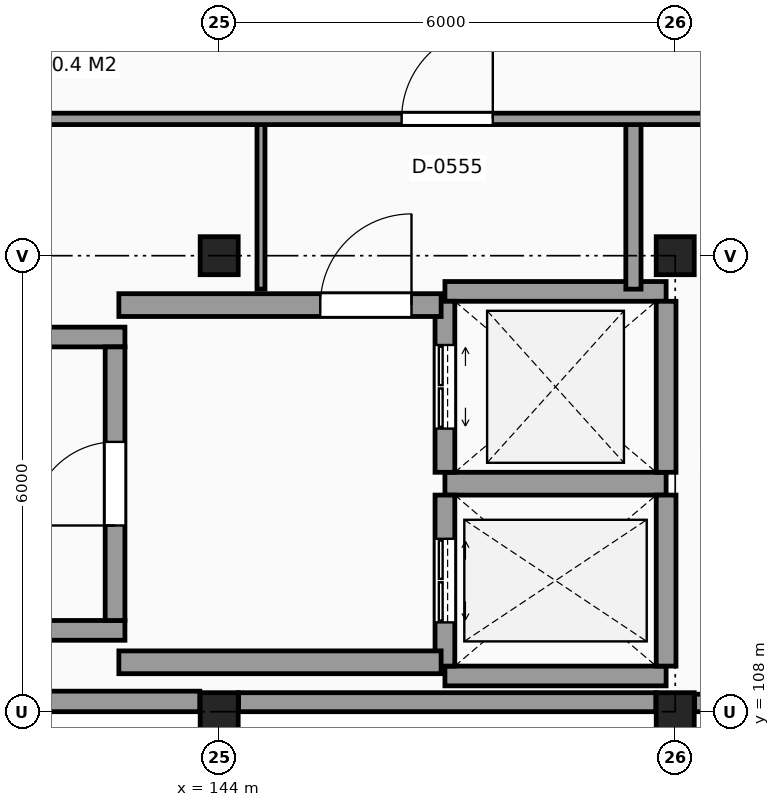
"""IFC4 building model, lengths in metres.
Left out: names, types, materials, properties, quantities, classifications, styles, units other than length and angle.
Written with IfcOpenShell. Run it as: python <this file> out.ifc"""

import sys

from ifc_helpers import new_model, si_unit, direction, frame, frame_2d, origin, origin_2d, place, context, subcontext, project, spatial, rectangle, extrude, element, fill, save


model = new_model("IFC4")
c1 = context("Model", 3, precision=1e-05, world=origin(), true_north=direction((0.0, 1.0)))
c2 = subcontext(c1, "Body", "Model", "MODEL_VIEW")
j1 = project(units=[si_unit("LENGTHUNIT", "METRE"), si_unit("PLANEANGLEUNIT", "RADIAN")], contexts=[c1])
p1 = place(None, origin())
s1 = spatial("IfcSite", under=j1, at=p1, CompositionType="ELEMENT")
p2 = place(p1, origin())
s2 = spatial("IfcBuilding", under=s1, at=p2, CompositionType="ELEMENT")
p3 = place(p2, frame((0.0, 0.0, 41.4)))
s3 = spatial("IfcBuildingStorey", under=s2, at=p3, CompositionType="ELEMENT", Elevation=41.4)
for number, where, z_axis, x_axis in (
    (1, (144.0, 108.0, 0.0), (0.0, 0.0, 1.0), (1.0, 0.0, 0.0)),
    (2, (144.0, 114.0, 0.0), (0.0, 0.0, 1.0), (1.0, 0.0, 0.0)),
    (3, (150.0, 108.0, 0.0), (0.0, 0.0, 1.0), (1.0, 0.0, 0.0)),
    (4, (150.0, 114.0, 0.0), (0.0, 0.0, 1.0), (1.0, 0.0, 0.0)),
):
    element("IfcColumn", number, at=place(p3, frame(where, z_axis=z_axis, x_axis=x_axis)), inside=s3, PredefinedType="COLUMN", context=c2, shape_type="SweptSolid", body=[
        extrude(rectangle(XDim=0.5, YDim=0.5, at=origin_2d()), origin(), (0.0, 0.0, 1.0), 3.3),
    ])
p4 = place(p3, frame((138.255, 108.135, 0.0), z_axis=(0.0, 0.0, 1.0), x_axis=(1.0, 0.0, 0.0)))
e5 = element("IfcWall", 5, at=p4, inside=s3, PredefinedType="SOLIDWALL", context=c2, shape_type="SweptSolid", body=[
    extrude(rectangle(XDim=5.49, YDim=0.27, at=frame_2d((2.745, 0.0))), origin(), (0.0, 0.0, 1.0), 2.41),
])
p5 = place(p3, frame((144.255, 108.125, 0.0), z_axis=(0.0, 0.0, 1.0), x_axis=(1.0, 0.0, 0.0)))
e6 = element("IfcWall", 6, at=p5, inside=s3, PredefinedType="SOLIDWALL", context=c2, shape_type="SweptSolid", body=[
    extrude(rectangle(XDim=5.49, YDim=0.25, at=frame_2d((2.745, 0.0))), origin(), (0.0, 0.0, 1.0), 2.41),
])
p6 = place(p3, frame((150.255, 108.115, 0.0), z_axis=(0.0, 0.0, 1.0), x_axis=(1.0, 0.0, 0.0)))
e7 = element("IfcWall", 7, at=p6, inside=s3, PredefinedType="SOLIDWALL", context=c2, shape_type="SweptSolid", body=[
    extrude(rectangle(XDim=5.49, YDim=0.23, at=frame_2d((2.745, 0.0))), origin(), (0.0, 0.0, 1.0), 2.41),
])
p7 = place(p6, frame((2.045, 0.0, 0.8)))
e8 = element("IfcOpeningElement", 8, at=p7, cuts=e7, PredefinedType="OPENING", context=c2, shape_type="SweptSolid", body=[
    extrude(rectangle(XDim=1.4, YDim=1.4, at=frame_2d((0.7, 0.7))), frame((0.0, 0.125, 0.0), z_axis=(0.0, -1.0, 0.0), x_axis=(1.0, 0.0, 0.0)), (0.0, 0.0, 1.0), 0.25),
])
for number, where, z_axis, x_axis in (
    (9, (132.04, 109.07, 0.0), (0.0, 0.0, 1.0), (1.0, 0.0, 0.0)),
    (10, (132.04, 112.93, 0.0), (0.0, 0.0, 1.0), (1.0, 0.0, 0.0)),
):
    element("IfcWall", number, at=place(p3, frame(where, z_axis=z_axis, x_axis=x_axis)), inside=s3, PredefinedType="SHEAR", context=c2, shape_type="SweptSolid", body=[
        extrude(rectangle(XDim=10.72, YDim=0.26, at=frame_2d((5.36, 0.0))), origin(), (0.0, 0.0, 1.0), 3.3),
    ])
p8 = place(p3, frame((142.63, 109.2, 0.0), z_axis=(0.0, 0.0, 1.0), x_axis=(0.0, 1.0, 0.0)))
e11 = element("IfcWall", 11, at=p8, inside=s3, PredefinedType="SHEAR", context=c2, shape_type="SweptSolid", body=[
    extrude(rectangle(XDim=3.6, YDim=0.26, at=frame_2d((1.8, 0.0))), origin(), (0.0, 0.0, 1.0), 3.3),
])
p9 = place(p8, frame((1.25, 0.0, 0.0)))
e12 = element("IfcOpeningElement", 12, at=p9, cuts=e11, PredefinedType="OPENING", context=c2, shape_type="SweptSolid", body=[
    extrude(rectangle(XDim=1.1, YDim=2.15, at=frame_2d((0.55, 1.075))), frame((0.0, 0.14, 0.0), z_axis=(0.0, -1.0, 0.0), x_axis=(1.0, 0.0, 0.0)), (0.0, 0.0, 1.0), 0.28),
])
p10 = place(p3, frame((146.97, 108.47, 0.0), z_axis=(0.0, 0.0, 1.0), x_axis=(1.0, 0.0, 0.0)))
e13 = element("IfcWall", 13, at=p10, inside=s3, PredefinedType="SHEAR", context=c2, shape_type="SweptSolid", body=[
    extrude(rectangle(XDim=2.91, YDim=0.26, at=frame_2d((1.455, 0.0))), origin(), (0.0, 0.0, 1.0), 3.3),
])
p11 = place(p3, frame((146.97, 111.0, 0.0), z_axis=(0.0, 0.0, 1.0), x_axis=(1.0, 0.0, 0.0)))
e14 = element("IfcWall", 14, at=p11, inside=s3, PredefinedType="SHEAR", context=c2, shape_type="SweptSolid", body=[
    extrude(rectangle(XDim=2.91, YDim=0.3, at=frame_2d((1.455, 0.0))), origin(), (0.0, 0.0, 1.0), 3.3),
])
p12 = place(p3, frame((149.88, 108.6, 0.0), z_axis=(0.0, 0.0, 1.0), x_axis=(0.0, 1.0, 0.0)))
e15 = element("IfcWall", 15, at=p12, inside=s3, PredefinedType="SHEAR", context=c2, shape_type="SweptSolid", body=[
    extrude(rectangle(XDim=2.25, YDim=0.26, at=frame_2d((1.125, 0.0))), origin(), (0.0, 0.0, 1.0), 3.3),
])
p13 = place(p3, frame((146.97, 108.6, 0.0), z_axis=(0.0, 0.0, 1.0), x_axis=(0.0, 1.0, 0.0)))
e16 = element("IfcWall", 16, at=p13, inside=s3, PredefinedType="SHEAR", context=c2, shape_type="SweptSolid", body=[
    extrude(rectangle(XDim=2.25, YDim=0.26, at=frame_2d((1.125, 0.0))), origin(), (0.0, 0.0, 1.0), 3.3),
])
p14 = place(p13, frame((0.575, 0.0, 0.0)))
e17 = element("IfcOpeningElement", 17, at=p14, cuts=e16, PredefinedType="OPENING", context=c2, shape_type="SweptSolid", body=[
    extrude(rectangle(XDim=1.1, YDim=2.2, at=frame_2d((0.55, 1.1))), frame((0.0, 0.14, 0.0), z_axis=(0.0, -1.0, 0.0), x_axis=(1.0, 0.0, 0.0)), (0.0, 0.0, 1.0), 0.28),
])
p15 = place(p3, frame((146.97, 113.53, 0.0), z_axis=(0.0, 0.0, 1.0), x_axis=(1.0, 0.0, 0.0)))
e18 = element("IfcWall", 18, at=p15, inside=s3, PredefinedType="SHEAR", context=c2, shape_type="SweptSolid", body=[
    extrude(rectangle(XDim=2.91, YDim=0.26, at=frame_2d((1.455, 0.0))), origin(), (0.0, 0.0, 1.0), 3.3),
])
p16 = place(p3, frame((149.88, 111.15, 0.0), z_axis=(0.0, 0.0, 1.0), x_axis=(0.0, 1.0, 0.0)))
e19 = element("IfcWall", 19, at=p16, inside=s3, PredefinedType="SHEAR", context=c2, shape_type="SweptSolid", body=[
    extrude(rectangle(XDim=2.25, YDim=0.26, at=frame_2d((1.125, 0.0))), origin(), (0.0, 0.0, 1.0), 3.3),
])
p17 = place(p3, frame((146.97, 111.15, 0.0), z_axis=(0.0, 0.0, 1.0), x_axis=(0.0, 1.0, 0.0)))
e20 = element("IfcWall", 20, at=p17, inside=s3, PredefinedType="SHEAR", context=c2, shape_type="SweptSolid", body=[
    extrude(rectangle(XDim=2.25, YDim=0.26, at=frame_2d((1.125, 0.0))), origin(), (0.0, 0.0, 1.0), 3.3),
])
p18 = place(p17, frame((0.575, 0.0, 0.0)))
e21 = element("IfcOpeningElement", 21, at=p18, cuts=e20, PredefinedType="OPENING", context=c2, shape_type="SweptSolid", body=[
    extrude(rectangle(XDim=1.1, YDim=2.2, at=frame_2d((0.55, 1.1))), frame((0.0, 0.14, 0.0), z_axis=(0.0, -1.0, 0.0), x_axis=(1.0, 0.0, 0.0)), (0.0, 0.0, 1.0), 0.28),
])
p19 = place(p3, frame((142.68, 113.35, 0.0), z_axis=(0.0, 0.0, 1.0), x_axis=(1.0, 0.0, 0.0)))
e22 = element("IfcWall", 22, at=p19, inside=s3, PredefinedType="SHEAR", context=c2, shape_type="SweptSolid", body=[
    extrude(rectangle(XDim=4.24, YDim=0.3, at=frame_2d((2.12, 0.0))), origin(), (0.0, 0.0, 1.0), 3.3),
])
p20 = place(p19, frame((2.65, 0.0, 0.0)))
e23 = element("IfcOpeningElement", 23, at=p20, cuts=e22, PredefinedType="OPENING", context=c2, shape_type="SweptSolid", body=[
    extrude(rectangle(XDim=1.2, YDim=2.2, at=frame_2d((0.6, 1.1))), frame((0.0, 0.16, 0.0), z_axis=(0.0, -1.0, 0.0), x_axis=(1.0, 0.0, 0.0)), (0.0, 0.0, 1.0), 0.32),
])
p21 = place(p3, frame((142.68, 108.65, 0.0), z_axis=(0.0, 0.0, 1.0), x_axis=(1.0, 0.0, 0.0)))
e24 = element("IfcWall", 24, at=p21, inside=s3, PredefinedType="SHEAR", context=c2, shape_type="SweptSolid", body=[
    extrude(rectangle(XDim=4.24, YDim=0.3, at=frame_2d((2.12, 0.0))), origin(), (0.0, 0.0, 1.0), 3.3),
])
p22 = place(p3, frame((144.55, 113.56, 0.0), z_axis=(0.0, 0.0, 1.0), x_axis=(0.0, 1.0, 0.0)))
e25 = element("IfcWall", 25, at=p22, inside=s3, PredefinedType="PARTITIONING", context=c2, shape_type="SweptSolid", body=[
    extrude(rectangle(XDim=2.24, YDim=0.105, at=frame_2d((1.12, 0.0))), origin(), (0.0, 0.0, 1.0), 3.06),
])
p23 = place(p3, frame((149.45, 113.56, 0.0), z_axis=(0.0, 0.0, 1.0), x_axis=(0.0, 1.0, 0.0)))
e26 = element("IfcWall", 26, at=p23, inside=s3, PredefinedType="PARTITIONING", context=c2, shape_type="SweptSolid", body=[
    extrude(rectangle(XDim=2.24, YDim=0.2, at=frame_2d((1.12, 0.0))), origin(), (0.0, 0.0, 1.0), 3.06),
])
p24 = place(p3, frame((102.275, 115.8, 0.0), z_axis=(0.0, 0.0, 1.0), x_axis=(1.0, 0.0, 0.0)))
e27 = element("IfcWall", 27, at=p24, inside=s3, PredefinedType="PARTITIONING", context=c2, shape_type="SweptSolid", body=[
    extrude(rectangle(XDim=67.525, YDim=0.15, at=frame_2d((33.763, 0.0))), origin(), (0.0, 0.0, 1.0), 3.06),
])
p25 = place(p24, frame((44.125, 0.0, 0.0)))
e28 = element("IfcOpeningElement", 28, at=p25, cuts=e27, PredefinedType="OPENING", context=c2, shape_type="SweptSolid", body=[
    extrude(rectangle(XDim=1.2, YDim=2.2, at=frame_2d((0.6, 1.1))), frame((0.0, 0.085, 0.0), z_axis=(0.0, -1.0, 0.0), x_axis=(1.0, 0.0, 0.0)), (0.0, 0.0, 1.0), 0.17),
])
p26 = place(p24, frame((14.125, 0.0, 0.0)))
e29 = element("IfcOpeningElement", 29, at=p26, cuts=e27, PredefinedType="OPENING", context=c2, shape_type="SweptSolid", body=[
    extrude(rectangle(XDim=1.2, YDim=2.2, at=frame_2d((0.6, 1.1))), frame((0.0, 0.085, 0.0), z_axis=(0.0, -1.0, 0.0), x_axis=(1.0, 0.0, 0.0)), (0.0, 0.0, 1.0), 0.17),
])
p27 = place(p24, frame((19.275, 0.0, 0.0)))
e30 = element("IfcOpeningElement", 30, at=p27, cuts=e27, PredefinedType="OPENING", context=c2, shape_type="SweptSolid", body=[
    extrude(rectangle(XDim=1.0, YDim=2.15, at=frame_2d((0.5, 1.075))), frame((0.0, 0.085, 0.0), z_axis=(0.0, -1.0, 0.0), x_axis=(1.0, 0.0, 0.0)), (0.0, 0.0, 1.0), 0.17),
])
p28 = place(p24, frame((26.245, 0.0, 0.0)))
e31 = element("IfcOpeningElement", 31, at=p28, cuts=e27, PredefinedType="OPENING", context=c2, shape_type="SweptSolid", body=[
    extrude(rectangle(XDim=0.96, YDim=2.15, at=frame_2d((0.48, 1.075))), frame((0.0, 0.085, 0.0), z_axis=(0.0, -1.0, 0.0), x_axis=(1.0, 0.0, 0.0)), (0.0, 0.0, 1.0), 0.17),
])
p29 = place(p24, frame((48.45, 0.0, 0.0)))
e32 = element("IfcOpeningElement", 32, at=p29, cuts=e27, PredefinedType="OPENING", context=c2, shape_type="SweptSolid", body=[
    extrude(rectangle(XDim=0.95, YDim=2.1, at=frame_2d((0.475, 1.05))), frame((0.0, 0.085, 0.0), z_axis=(0.0, -1.0, 0.0), x_axis=(1.0, 0.0, 0.0)), (0.0, 0.0, 1.0), 0.17),
])
p30 = place(p9, origin())
e33 = element("IfcDoor", 33, at=p30, inside=s3, OperationType="SINGLE_SWING_LEFT", PredefinedType="DOOR", context=c2, shape_type="SweptSolid", body=[
    extrude(rectangle(XDim=1.1, YDim=2.15, at=frame_2d((0.55, 1.075))), frame((0.0, 0.025, 0.0), z_axis=(0.0, -1.0, 0.0), x_axis=(1.0, 0.0, 0.0)), (0.0, 0.0, 1.0), 0.05),
])
fill(e12, e33)
p31 = place(p14, origin())
e34 = element("IfcDoor", 34, at=p31, inside=s3, OperationType="DOUBLE_DOOR_SLIDING", PredefinedType="DOOR", context=c2, shape_type="SweptSolid", body=[
    extrude(rectangle(XDim=1.1, YDim=2.2, at=frame_2d((0.55, 1.1))), frame((0.0, 0.025, 0.0), z_axis=(0.0, -1.0, 0.0), x_axis=(1.0, 0.0, 0.0)), (0.0, 0.0, 1.0), 0.05),
])
fill(e17, e34)
p32 = place(p18, origin())
e35 = element("IfcDoor", 35, at=p32, inside=s3, OperationType="DOUBLE_DOOR_SLIDING", PredefinedType="DOOR", context=c2, shape_type="SweptSolid", body=[
    extrude(rectangle(XDim=1.1, YDim=2.2, at=frame_2d((0.55, 1.1))), frame((0.0, 0.025, 0.0), z_axis=(0.0, -1.0, 0.0), x_axis=(1.0, 0.0, 0.0)), (0.0, 0.0, 1.0), 0.05),
])
fill(e21, e35)
p33 = place(p20, origin())
e36 = element("IfcDoor", 36, at=p33, inside=s3, OperationType="SINGLE_SWING_RIGHT", PredefinedType="DOOR", context=c2, shape_type="SweptSolid", body=[
    extrude(rectangle(XDim=1.2, YDim=2.2, at=frame_2d((0.6, 1.1))), frame((0.0, 0.025, 0.0), z_axis=(0.0, -1.0, 0.0), x_axis=(1.0, 0.0, 0.0)), (0.0, 0.0, 1.0), 0.05),
])
fill(e23, e36)
p34 = place(p25, origin())
e37 = element("IfcDoor", 37, at=p34, inside=s3, OperationType="SINGLE_SWING_RIGHT", PredefinedType="DOOR", context=c2, shape_type="SweptSolid", body=[
    extrude(rectangle(XDim=1.2, YDim=2.2, at=frame_2d((0.6, 1.1))), frame((0.0, 0.025, 0.0), z_axis=(0.0, -1.0, 0.0), x_axis=(1.0, 0.0, 0.0)), (0.0, 0.0, 1.0), 0.05),
])
fill(e28, e37)
save(model, sys.argv[1])
